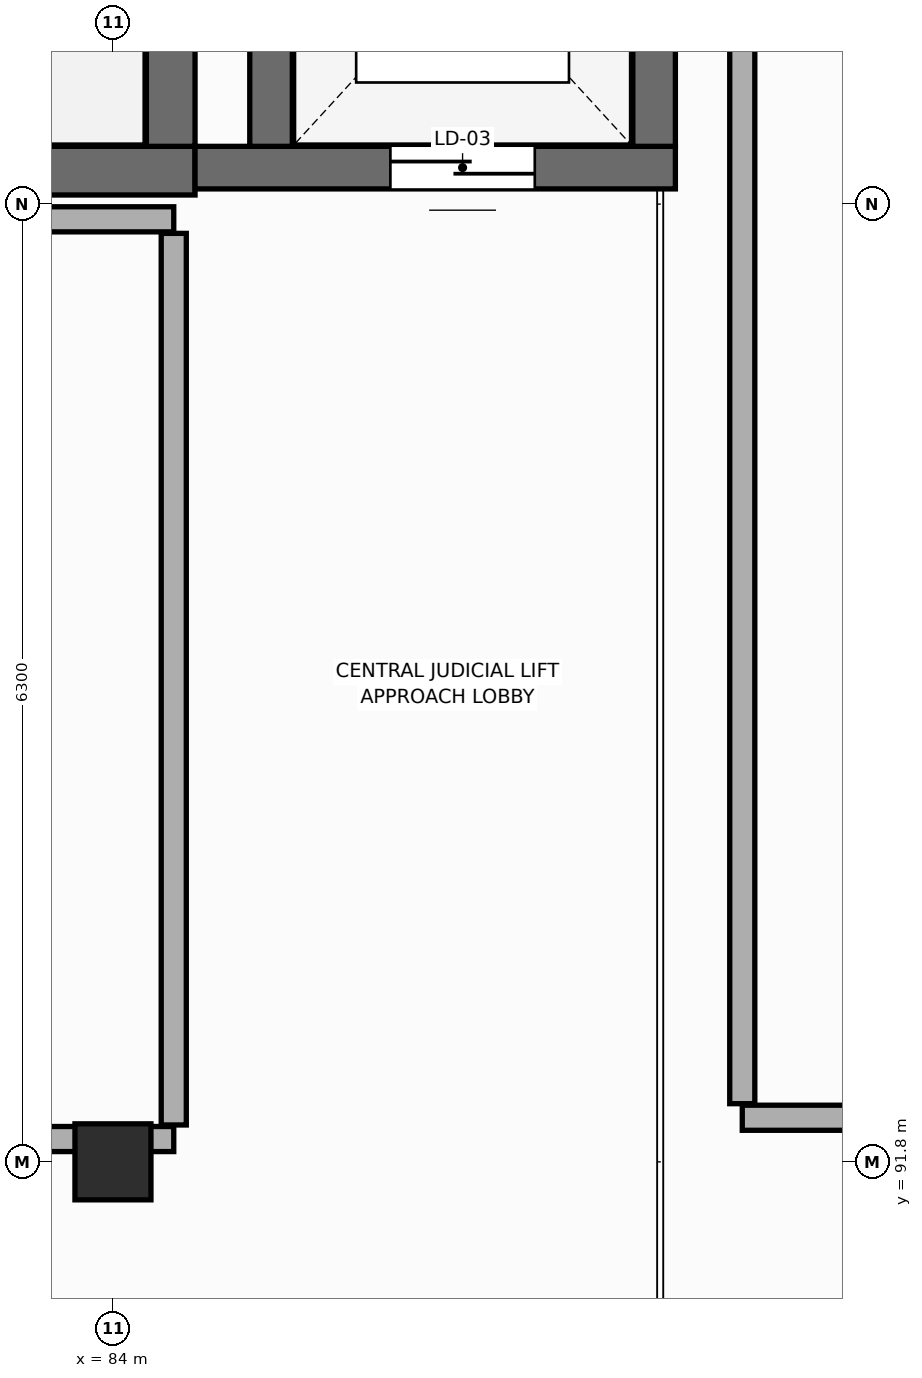
"""IFC4 building model, lengths in metres.
Left out: names, types, materials, properties, quantities, classifications, styles, units other than length and angle.
Written with IfcOpenShell. Run it as: python <this file> out.ifc"""

import sys

from ifc_helpers import new_model, si_unit, direction, frame, frame_2d, origin, origin_2d, place, context, subcontext, project, spatial, rectangle, extrude, element, fill, save


model = new_model("IFC4")
c1 = context("Model", 3, precision=1e-05, world=origin(), true_north=direction((0.0, 1.0)))
c2 = subcontext(c1, "Body", "Model", "MODEL_VIEW")
j1 = project(units=[si_unit("LENGTHUNIT", "METRE"), si_unit("PLANEANGLEUNIT", "RADIAN")], contexts=[c1])
p1 = place(None, origin())
s1 = spatial("IfcSite", under=j1, at=p1, CompositionType="ELEMENT")
p2 = place(p1, origin())
s2 = spatial("IfcBuilding", under=s1, at=p2, CompositionType="ELEMENT")
p3 = place(p2, frame((0.0, 0.0, 27.0)))
s3 = spatial("IfcBuildingStorey", under=s2, at=p3, CompositionType="ELEMENT", Elevation=27.0)
p4 = place(p3, frame((84.0, 91.8, 0.0), z_axis=(0.0, 0.0, 1.0), x_axis=(1.0, 0.0, 0.0)))
e1 = element("IfcColumn", 1, at=p4, inside=s3, PredefinedType="COLUMN", context=c2, shape_type="SweptSolid", body=[
    extrude(rectangle(XDim=0.5, YDim=0.5, at=origin_2d()), origin(), (0.0, 0.0, 1.0), 4.2),
])
p5 = place(p3, frame((84.54, 98.32, 0.0), z_axis=(0.0, 0.0, 1.0), x_axis=(-1.0, 0.0, 0.0)))
e2 = element("IfcWall", 2, at=p5, inside=s3, PredefinedType="SHEAR", context=c2, shape_type="SweptSolid", body=[
    extrude(rectangle(XDim=9.08, YDim=0.32, at=frame_2d((4.54, 0.0))), origin(), (0.0, 0.0, 1.0), 3.98),
])
p6 = place(p3, frame((84.38, 101.76, 0.0), z_axis=(0.0, 0.0, 1.0), x_axis=(0.0, -1.0, 0.0)))
e3 = element("IfcWall", 3, at=p6, inside=s3, PredefinedType="SHEAR", context=c2, shape_type="SweptSolid", body=[
    extrude(rectangle(XDim=3.28, YDim=0.32, at=frame_2d((1.64, 0.0))), origin(), (0.0, 0.0, 1.0), 3.98),
])
p7 = place(p3, frame((87.7, 98.34, 0.0), z_axis=(0.0, 0.0, 1.0), x_axis=(-1.0, 0.0, 0.0)))
e4 = element("IfcWall", 4, at=p7, inside=s3, PredefinedType="SHEAR", context=c2, shape_type="SweptSolid", body=[
    extrude(rectangle(XDim=3.16, YDim=0.28, at=frame_2d((1.58, 0.0))), origin(), (0.0, 0.0, 1.0), 3.98),
])
p8 = place(p7, frame((0.925, 0.0, 0.0)))
e5 = element("IfcOpeningElement", 5, at=p8, cuts=e4, PredefinedType="OPENING", context=c2, shape_type="SweptSolid", body=[
    extrude(rectangle(XDim=0.95, YDim=2.15, at=frame_2d((0.475, 1.075))), frame((0.0, 0.15, 0.0), z_axis=(0.0, -1.0, 0.0), x_axis=(1.0, 0.0, 0.0)), (0.0, 0.0, 1.0), 0.3),
])
for number, where, z_axis, x_axis in (
    (6, (85.04, 98.48, 0.0), (0.0, 0.0, 1.0), (0.0, 1.0, 0.0)),
    (7, (87.56, 100.92, 0.0), (0.0, 0.0, 1.0), (0.0, -1.0, 0.0)),
):
    element("IfcWall", number, at=place(p3, frame(where, z_axis=z_axis, x_axis=x_axis)), inside=s3, PredefinedType="SHEAR", context=c2, shape_type="SweptSolid", body=[
        extrude(rectangle(XDim=2.44, YDim=0.28, at=frame_2d((1.22, 0.0))), origin(), (0.0, 0.0, 1.0), 3.98),
    ])
p9 = place(p3, frame((75.6, 98.0, 0.0), z_axis=(0.0, 0.0, 1.0), x_axis=(1.0, 0.0, 0.0)))
e8 = element("IfcWall", 8, at=p9, inside=s3, PredefinedType="PARTITIONING", context=c2, shape_type="SweptSolid", body=[
    extrude(rectangle(XDim=8.8, YDim=0.165, at=frame_2d((4.4, 0.0))), origin(), (0.0, 0.0, 1.0), 3.11),
])
p10 = place(p3, frame((84.4, 91.95, 0.0), z_axis=(0.0, 0.0, 1.0), x_axis=(-1.0, 0.0, 0.0)))
e9 = element("IfcWall", 9, at=p10, inside=s3, PredefinedType="PARTITIONING", context=c2, shape_type="SweptSolid", body=[
    extrude(rectangle(XDim=8.8, YDim=0.165, at=frame_2d((4.4, 0.0))), origin(), (0.0, 0.0, 1.0), 3.11),
])
p11 = place(p10, frame((3.19, 0.0, 0.0)))
e10 = element("IfcOpeningElement", 10, at=p11, cuts=e9, PredefinedType="OPENING", context=c2, shape_type="SweptSolid", body=[
    extrude(rectangle(XDim=1.0, YDim=2.15, at=frame_2d((0.5, 1.075))), frame((0.0, 0.093, 0.0), z_axis=(0.0, -1.0, 0.0), x_axis=(1.0, 0.0, 0.0)), (0.0, 0.0, 1.0), 0.185),
])
p12 = place(p3, frame((84.4, 97.907, 0.0), z_axis=(0.0, 0.0, 1.0), x_axis=(0.0, -1.0, 0.0)))
e11 = element("IfcWall", 11, at=p12, inside=s3, PredefinedType="PARTITIONING", context=c2, shape_type="SweptSolid", body=[
    extrude(rectangle(XDim=5.865, YDim=0.165, at=frame_2d((2.933, 0.0))), origin(), (0.0, 0.0, 1.0), 3.11),
])
p13 = place(p3, frame((94.76, 92.09, 0.0), z_axis=(0.0, 0.0, 1.0), x_axis=(-1.0, 0.0, 0.0)))
e12 = element("IfcWall", 12, at=p13, inside=s3, PredefinedType="PARTITIONING", context=c2, shape_type="SweptSolid", body=[
    extrude(rectangle(XDim=6.62, YDim=0.165, at=frame_2d((3.31, 0.0))), origin(), (0.0, 0.0, 1.0), 3.31),
])
p14 = place(p13, frame((4.055, 0.0, 0.0)))
e13 = element("IfcOpeningElement", 13, at=p14, cuts=e12, PredefinedType="OPENING", context=c2, shape_type="SweptSolid", body=[
    extrude(rectangle(XDim=0.98, YDim=2.2, at=frame_2d((0.49, 1.1))), frame((0.0, 0.093, 0.0), z_axis=(0.0, -1.0, 0.0), x_axis=(1.0, 0.0, 0.0)), (0.0, 0.0, 1.0), 0.185),
])
p15 = place(p3, frame((88.14, 92.183, 0.0), z_axis=(0.0, 0.0, 1.0), x_axis=(0.0, 1.0, 0.0)))
e14 = element("IfcWall", 14, at=p15, inside=s3, PredefinedType="PARTITIONING", context=c2, shape_type="SweptSolid", body=[
    extrude(rectangle(XDim=11.813, YDim=0.165, at=frame_2d((5.907, 0.0))), origin(), (0.0, 0.0, 1.0), 3.41),
])
p16 = place(p8, origin())
e15 = element("IfcDoor", 15, at=p16, inside=s3, OperationType="DOUBLE_DOOR_SLIDING", PredefinedType="DOOR", context=c2, shape_type="SweptSolid", body=[
    extrude(rectangle(XDim=0.95, YDim=2.15, at=frame_2d((0.475, 1.075))), frame((0.0, 0.025, 0.0), z_axis=(0.0, -1.0, 0.0), x_axis=(1.0, 0.0, 0.0)), (0.0, 0.0, 1.0), 0.05),
])
fill(e5, e15)
save(model, sys.argv[1])
